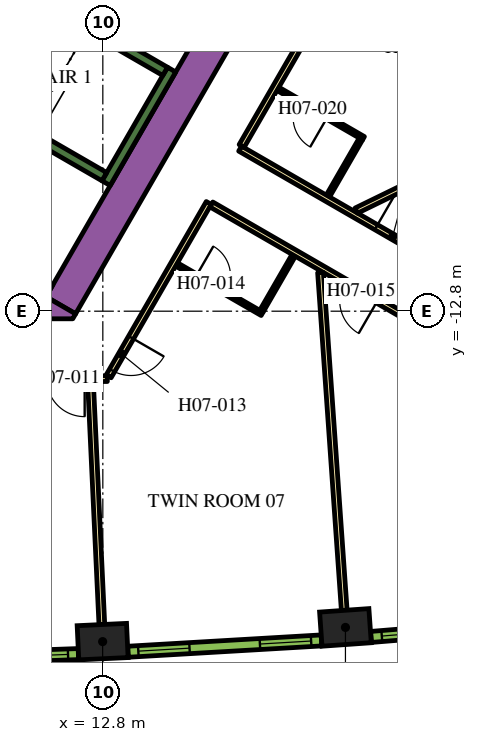
"""IFC4 building model, lengths in metres.
Left out: names, types, materials, properties, quantities, classifications, styles, units other than length and angle.
Written with IfcOpenShell. Run it as: python <this file> out.ifc"""

import sys

from ifc_helpers import new_model, si_unit, direction, frame, frame_2d, origin, origin_2d, place, context, subcontext, project, spatial, polyline, rectangle, outline, extrude, element, fill, save


model = new_model("IFC4")
c1 = context("Model", 3, precision=1e-05, world=origin(), true_north=direction((0.0, 1.0)))
c2 = subcontext(c1, "Body", "Model", "MODEL_VIEW")
j1 = project(units=[si_unit("LENGTHUNIT", "METRE"), si_unit("PLANEANGLEUNIT", "RADIAN")], contexts=[c1])
p1 = place(None, origin())
s1 = spatial("IfcSite", under=j1, at=p1, CompositionType="ELEMENT")
p2 = place(p1, origin())
s2 = spatial("IfcBuilding", under=s1, at=p2, CompositionType="ELEMENT")
p3 = place(p2, frame((0.0, 0.0, 103.2)))
s3 = spatial("IfcBuildingStorey", under=s2, at=p3, CompositionType="ELEMENT", Elevation=103.2)
for number, where, z_axis, x_axis in (
    (1, (12.795, -21.494, 0.0), (0.0, 0.0, 1.0), (0.999, 0.047, 0.0)),
    (2, (19.184, -21.12, 0.0), (0.0, 0.0, 1.0), (0.998, 0.07, 0.0)),
):
    element("IfcColumn", number, at=place(p3, frame(where, z_axis=z_axis, x_axis=x_axis)), inside=s3, PredefinedType="COLUMN", context=c2, shape_type="SweptSolid", body=[
        extrude(rectangle(XDim=1.3, YDim=0.9, at=origin_2d()), origin(), (0.0, 0.0, 1.0), 3.9),
    ])
p4 = place(p3, frame((11.695, -12.644, 0.0), z_axis=(0.0, 0.0, 1.0), x_axis=(0.500010229568, 0.86601949766, 0.0)))
e3 = element("IfcWall", 3, at=p4, inside=s3, PredefinedType="SOLIDWALL", context=c2, shape_type="SweptSolid", body=[
    extrude(rectangle(XDim=9.326, YDim=0.9, at=frame_2d((4.663, 0.0))), origin(), (0.0, 0.0, 1.0), 3.9),
])
p5 = place(p3, origin())
e4 = element("IfcWall", 4, at=p5, inside=s3, PredefinedType="SOLIDWALL", context=c2, shape_type="SweptSolid", body=[
    extrude(outline(polyline([(12.009, -13.0), (11.312, -13.0), (11.312, -12.425), (12.083, -12.871), (12.009, -13.0)])), origin(), (0.0, 0.0, 1.0), 3.9),
])
e5 = element("IfcWall", 5, at=p5, inside=s3, PredefinedType="SOLIDWALL", context=c2, shape_type="SweptSolid", body=[
    extrude(outline(polyline([(11.489, -12.1), (11.312, -12.407), (11.312, -12.1), (11.489, -12.1)])), origin(), (0.0, 0.0, 1.0), 3.9),
])
p6 = place(p3, frame((12.885, -9.431, 0.0), z_axis=(0.0, 0.0, 1.0), x_axis=(0.500020560727, 0.866013532718, 0.0)))
e6 = element("IfcWall", 6, at=p6, inside=s3, PredefinedType="SOLIDWALL", context=c2, shape_type="SweptSolid", body=[
    extrude(rectangle(XDim=3.45, YDim=0.25, at=frame_2d((1.725, 0.0))), origin(), (0.0, 0.0, 1.0), 3.9),
])
p7 = place(p3, frame((12.84, -9.261, 0.0), z_axis=(0.0, 0.0, 1.0), x_axis=(-0.866013990052, 0.500019768644, 0.0)))
e7 = element("IfcWall", 7, at=p7, inside=s3, PredefinedType="SOLIDWALL", context=c2, shape_type="SweptSolid", body=[
    extrude(rectangle(XDim=6.8, YDim=0.25, at=frame_2d((3.4, 0.0))), origin(), (0.0, 0.0, 1.0), 3.9),
])
p8 = place(p3, frame((8.334, -2.964, 0.0), z_axis=(0.0, 0.0, 1.0), x_axis=(0.866016039709, -0.500016218704, 0.0)))
e8 = element("IfcWall", 8, at=p8, inside=s3, PredefinedType="SOLIDWALL", context=c2, shape_type="SweptSolid", body=[
    extrude(rectangle(XDim=7.05, YDim=0.25, at=frame_2d((3.525, 0.0))), origin(), (0.0, 0.0, 1.0), 3.9),
])
p9 = place(p3, frame((16.412, -8.523, 0.0), z_axis=(0.0, 0.0, 1.0), x_axis=(0.866025629663, -0.499999608766, 0.0)))
e9 = element("IfcWall", 9, at=p9, inside=s3, PredefinedType="PARTITIONING", context=c2, shape_type="SweptSolid", body=[
    extrude(rectangle(XDim=13.624, YDim=0.15, at=frame_2d((6.812, 0.0))), origin(), (0.0, 0.0, 1.0), 2.75),
])
p10 = place(p9, frame((4.134, 0.0, 0.0)))
e10 = element("IfcOpeningElement", 10, at=p10, cuts=e9, PredefinedType="OPENING", context=c2, shape_type="SweptSolid", body=[
    extrude(rectangle(XDim=1.0, YDim=2.1, at=frame_2d((0.5, 1.05))), frame((0.0, 0.085, 0.0), z_axis=(0.0, -1.0, 0.0), x_axis=(1.0, 0.0, 0.0)), (0.0, 0.0, 1.0), 0.17),
])
p11 = place(p3, frame((19.081, -3.9, 0.0), z_axis=(0.0, 0.0, 1.0), x_axis=(-0.499974327079, -0.866040225545, 0.0)))
e11 = element("IfcWall", 11, at=p11, inside=s3, PredefinedType="PARTITIONING", context=c2, shape_type="SweptSolid", body=[
    extrude(rectangle(XDim=5.258, YDim=0.15, at=frame_2d((2.629, 0.0))), origin(), (0.0, 0.0, 1.0), 2.75),
])
p12 = place(p11, frame((0.18, 0.0, 0.0)))
e12 = element("IfcOpeningElement", 12, at=p12, cuts=e11, PredefinedType="OPENING", context=c2, shape_type="SweptSolid", body=[
    extrude(rectangle(XDim=1.0, YDim=2.1, at=frame_2d((0.5, 1.05))), frame((0.0, 0.085, 0.0), z_axis=(0.0, -1.0, 0.0), x_axis=(1.0, 0.0, 0.0)), (0.0, 0.0, 1.0), 0.17),
])
p13 = place(p3, frame((12.918, -14.575, 0.0), z_axis=(0.0, 0.0, 1.0), x_axis=(-1.0, 0.0, 0.0)))
e13 = element("IfcWall", 13, at=p13, inside=s3, PredefinedType="PARTITIONING", context=c2, shape_type="SweptSolid", body=[
    extrude(rectangle(XDim=25.766, YDim=0.15, at=frame_2d((12.883, 0.0))), origin(), (0.0, 0.0, 1.0), 2.75),
])
p14 = place(p13, frame((24.24, 0.0, 0.0)))
e14 = element("IfcOpeningElement", 14, at=p14, cuts=e13, PredefinedType="OPENING", context=c2, shape_type="SweptSolid", body=[
    extrude(rectangle(XDim=1.0, YDim=2.1, at=frame_2d((0.5, 1.05))), frame((0.0, 0.085, 0.0), z_axis=(0.0, -1.0, 0.0), x_axis=(1.0, 0.0, 0.0)), (0.0, 0.0, 1.0), 0.17),
])
p15 = place(p13, frame((13.144, 0.0, 0.0)))
e15 = element("IfcOpeningElement", 15, at=p15, cuts=e13, PredefinedType="OPENING", context=c2, shape_type="SweptSolid", body=[
    extrude(rectangle(XDim=1.0, YDim=2.1, at=frame_2d((0.5, 1.05))), frame((0.0, 0.085, 0.0), z_axis=(0.0, -1.0, 0.0), x_axis=(1.0, 0.0, 0.0)), (0.0, 0.0, 1.0), 0.17),
])
p16 = place(p13, frame((11.693, 0.0, 0.0)))
e16 = element("IfcOpeningElement", 16, at=p16, cuts=e13, PredefinedType="OPENING", context=c2, shape_type="SweptSolid", body=[
    extrude(rectangle(XDim=1.0, YDim=2.1, at=frame_2d((0.5, 1.05))), frame((0.0, 0.085, 0.0), z_axis=(0.0, -1.0, 0.0), x_axis=(1.0, 0.0, 0.0)), (0.0, 0.0, 1.0), 0.17),
])
p17 = place(p13, frame((0.596, 0.0, 0.0)))
e17 = element("IfcOpeningElement", 17, at=p17, cuts=e13, PredefinedType="OPENING", context=c2, shape_type="SweptSolid", body=[
    extrude(rectangle(XDim=1.0, YDim=2.1, at=frame_2d((0.5, 1.05))), frame((0.0, 0.085, 0.0), z_axis=(0.0, -1.0, 0.0), x_axis=(1.0, 0.0, 0.0)), (0.0, 0.0, 1.0), 0.17),
])
p18 = place(p3, frame((15.587, -9.952, 0.0), z_axis=(0.0, 0.0, 1.0), x_axis=(-0.500016618951, -0.866015808616, 0.0)))
e18 = element("IfcWall", 18, at=p18, inside=s3, PredefinedType="PARTITIONING", context=c2, shape_type="SweptSolid", body=[
    extrude(rectangle(XDim=5.268, YDim=0.15, at=frame_2d((2.634, 0.0))), origin(), (0.0, 0.0, 1.0), 2.75),
])
p19 = place(p18, frame((4.088, 0.0, 0.0)))
e19 = element("IfcOpeningElement", 19, at=p19, cuts=e18, PredefinedType="OPENING", context=c2, shape_type="SweptSolid", body=[
    extrude(rectangle(XDim=1.0, YDim=2.1, at=frame_2d((0.5, 1.05))), frame((0.0, 0.085, 0.0), z_axis=(0.0, -1.0, 0.0), x_axis=(1.0, 0.0, 0.0)), (0.0, 0.0, 1.0), 0.17),
])
p20 = place(p3, frame((27.386, -16.764, 0.0), z_axis=(0.0, 0.0, 1.0), x_axis=(-0.866022585856, 0.500004880763, 0.0)))
e20 = element("IfcWall", 20, at=p20, inside=s3, PredefinedType="PARTITIONING", context=c2, shape_type="SweptSolid", body=[
    extrude(rectangle(XDim=13.544, YDim=0.15, at=frame_2d((6.772, 0.0))), origin(), (0.0, 0.0, 1.0), 2.75),
])
p21 = place(p20, frame((8.491, 0.0, 0.0)))
e21 = element("IfcOpeningElement", 21, at=p21, cuts=e20, PredefinedType="OPENING", context=c2, shape_type="SweptSolid", body=[
    extrude(rectangle(XDim=1.0, YDim=2.1, at=frame_2d((0.5, 1.05))), frame((0.0, 0.085, 0.0), z_axis=(0.0, -1.0, 0.0), x_axis=(1.0, 0.0, 0.0)), (0.0, 0.0, 1.0), 0.17),
])
p22 = place(p3, frame((12.774, -21.045, 0.0), z_axis=(0.0, 0.0, 1.0), x_axis=(-0.046750341626, 0.998906605023, 0.0)))
e22 = element("IfcWall", 22, at=p22, inside=s3, PredefinedType="PARTITIONING", context=c2, shape_type="SweptSolid", body=[
    extrude(rectangle(XDim=6.392, YDim=0.15, at=frame_2d((3.196, 0.0))), origin(), (0.0, 0.0, 1.0), 2.75),
])
p23 = place(p3, frame((19.153, -20.671, 0.0), z_axis=(0.0, 0.0, 1.0), x_axis=(-0.070070736723, 0.997542025107, 0.0)))
e23 = element("IfcWall", 23, at=p23, inside=s3, PredefinedType="PARTITIONING", context=c2, shape_type="SweptSolid", body=[
    extrude(rectangle(XDim=8.909, YDim=0.15, at=frame_2d((4.455, 0.0))), origin(), (0.0, 0.0, 1.0), 2.75),
])
p24 = place(p3, frame((27.479, -6.251, 0.0), z_axis=(0.0, 0.0, 1.0), x_axis=(-0.898945877276, -0.438059710231, 0.0)))
e24 = element("IfcWall", 24, at=p24, inside=s3, PredefinedType="PARTITIONING", context=c2, shape_type="SweptSolid", body=[
    extrude(rectangle(XDim=8.909, YDim=0.15, at=frame_2d((4.455, 0.0))), origin(), (0.0, 0.0, 1.0), 2.75),
])
p25 = place(p3, frame((14.74, -11.57, 0.0), z_axis=(0.0, 0.0, 1.0), x_axis=(0.866021400173, -0.500006934395, 0.0)))
e25 = element("IfcWall", 25, at=p25, inside=s3, PredefinedType="PARTITIONING", context=c2, shape_type="SweptSolid", body=[
    extrude(rectangle(XDim=2.6, YDim=0.1, at=frame_2d((1.3, 0.0))), origin(), (0.0, 0.0, 1.0), 2.75),
])
p26 = place(p25, frame((0.6, 0.0, 0.0)))
e26 = element("IfcOpeningElement", 26, at=p26, cuts=e25, PredefinedType="OPENING", context=c2, shape_type="SweptSolid", body=[
    extrude(rectangle(XDim=0.9, YDim=2.1, at=frame_2d((0.45, 1.05))), frame((0.0, 0.06, 0.0), z_axis=(0.0, -1.0, 0.0), x_axis=(1.0, 0.0, 0.0)), (0.0, 0.0, 1.0), 0.12),
])
p27 = place(p3, frame((16.978, -12.793, 0.0), z_axis=(0.0, 0.0, 1.0), x_axis=(0.500147619332, 0.865940158947, 0.0)))
e27 = element("IfcWall", 27, at=p27, inside=s3, PredefinedType="PARTITIONING", context=c2, shape_type="SweptSolid", body=[
    extrude(rectangle(XDim=1.69, YDim=0.1, at=frame_2d((0.845, 0.0))), origin(), (0.0, 0.0, 1.0), 2.75),
])
p28 = place(p3, frame((19.659, -8.25, 0.0), z_axis=(0.0, 0.0, 1.0), x_axis=(-0.866021400173, 0.500006934395, 0.0)))
e28 = element("IfcWall", 28, at=p28, inside=s3, PredefinedType="PARTITIONING", context=c2, shape_type="SweptSolid", body=[
    extrude(rectangle(XDim=2.6, YDim=0.1, at=frame_2d((1.3, 0.0))), origin(), (0.0, 0.0, 1.0), 2.75),
])
p29 = place(p28, frame((1.1, 0.0, 0.0)))
e29 = element("IfcOpeningElement", 29, at=p29, cuts=e28, PredefinedType="OPENING", context=c2, shape_type="SweptSolid", body=[
    extrude(rectangle(XDim=0.9, YDim=2.1, at=frame_2d((0.45, 1.05))), frame((0.0, 0.06, 0.0), z_axis=(0.0, -1.0, 0.0), x_axis=(1.0, 0.0, 0.0)), (0.0, 0.0, 1.0), 0.12),
])
p30 = place(p3, frame((19.591, -8.268, 0.0), z_axis=(0.0, 0.0, 1.0), x_axis=(-0.500040090343, -0.866002256377, 0.0)))
e30 = element("IfcWall", 30, at=p30, inside=s3, PredefinedType="PARTITIONING", context=c2, shape_type="SweptSolid", body=[
    extrude(rectangle(XDim=1.73, YDim=0.1, at=frame_2d((0.865, 0.0))), origin(), (0.0, 0.0, 1.0), 2.75),
])
p31 = place(p3, frame((7.059, -22.001, 0.0), z_axis=(0.0, 0.0, 1.0), x_axis=(0.999385993957, 0.035037623812, 0.0)))
e31 = element("IfcWall", 31, at=p31, inside=s3, PredefinedType="SOLIDWALL", context=c2, shape_type="SweptSolid", body=[
    extrude(rectangle(XDim=5.101, YDim=0.29, at=frame_2d((2.55, 0.0))), origin(), (0.0, 0.0, 1.0), 3.65),
])
p32 = place(p31, frame((0.273, 0.0, 0.9)))
e32 = element("IfcOpeningElement", 32, at=p32, cuts=e31, PredefinedType="OPENING", context=c2, shape_type="SweptSolid", body=[
    extrude(rectangle(XDim=1.35, YDim=2.15, at=frame_2d((0.675, 1.075))), frame((0.0, 0.155, 0.0), z_axis=(0.0, -1.0, 0.0), x_axis=(1.0, 0.0, 0.0)), (0.0, 0.0, 1.0), 0.31),
])
p33 = place(p31, frame((3.478, 0.0, 0.9)))
e33 = element("IfcOpeningElement", 33, at=p33, cuts=e31, PredefinedType="OPENING", context=c2, shape_type="SweptSolid", body=[
    extrude(rectangle(XDim=1.35, YDim=2.15, at=frame_2d((0.675, 1.075))), frame((0.0, 0.155, 0.0), z_axis=(0.0, -1.0, 0.0), x_axis=(1.0, 0.0, 0.0)), (0.0, 0.0, 1.0), 0.31),
])
p34 = place(p3, frame((13.462, -21.761, 0.0), z_axis=(0.0, 0.0, 1.0), x_axis=(0.998290511436, 0.058447025388, 0.0)))
e34 = element("IfcWall", 34, at=p34, inside=s3, PredefinedType="SOLIDWALL", context=c2, shape_type="SweptSolid", body=[
    extrude(rectangle(XDim=5.1, YDim=0.29, at=frame_2d((2.55, 0.0))), origin(), (0.0, 0.0, 1.0), 3.65),
])
p35 = place(p34, frame((0.272, 0.0, 0.9)))
e35 = element("IfcOpeningElement", 35, at=p35, cuts=e34, PredefinedType="OPENING", context=c2, shape_type="SweptSolid", body=[
    extrude(rectangle(XDim=1.35, YDim=2.15, at=frame_2d((0.675, 1.075))), frame((0.0, 0.155, 0.0), z_axis=(0.0, -1.0, 0.0), x_axis=(1.0, 0.0, 0.0)), (0.0, 0.0, 1.0), 0.31),
])
p36 = place(p34, frame((3.478, 0.0, 0.9)))
e36 = element("IfcOpeningElement", 36, at=p36, cuts=e34, PredefinedType="OPENING", context=c2, shape_type="SweptSolid", body=[
    extrude(rectangle(XDim=1.35, YDim=2.15, at=frame_2d((0.675, 1.075))), frame((0.0, 0.155, 0.0), z_axis=(0.0, -1.0, 0.0), x_axis=(1.0, 0.0, 0.0)), (0.0, 0.0, 1.0), 0.31),
])
p37 = place(p3, frame((19.857, -21.371, 0.0), z_axis=(0.0, 0.0, 1.0), x_axis=(0.99665273362, 0.081751627308, 0.0)))
e37 = element("IfcWall", 37, at=p37, inside=s3, PredefinedType="SOLIDWALL", context=c2, shape_type="SweptSolid", body=[
    extrude(rectangle(XDim=5.107, YDim=0.29, at=frame_2d((2.553, 0.0))), origin(), (0.0, 0.0, 1.0), 3.65),
])
p38 = place(p37, frame((0.285, 0.0, 0.9)))
e38 = element("IfcOpeningElement", 38, at=p38, cuts=e37, PredefinedType="OPENING", context=c2, shape_type="SweptSolid", body=[
    extrude(rectangle(XDim=1.35, YDim=2.15, at=frame_2d((0.675, 1.075))), frame((0.0, 0.155, 0.0), z_axis=(0.0, -1.0, 0.0), x_axis=(1.0, 0.0, 0.0)), (0.0, 0.0, 1.0), 0.31),
])
p39 = place(p37, frame((3.516, 0.0, 0.9)))
e39 = element("IfcOpeningElement", 39, at=p39, cuts=e37, PredefinedType="OPENING", context=c2, shape_type="SweptSolid", body=[
    extrude(rectangle(XDim=1.35, YDim=2.15, at=frame_2d((0.675, 1.075))), frame((0.0, 0.155, 0.0), z_axis=(0.0, -1.0, 0.0), x_axis=(1.0, 0.0, 0.0)), (0.0, 0.0, 1.0), 0.31),
])
p40 = place(p17, origin())
e40 = element("IfcDoor", 40, at=p40, inside=s3, OperationType="SINGLE_SWING_LEFT", PredefinedType="DOOR", context=c2, shape_type="SweptSolid", body=[
    extrude(rectangle(XDim=1.0, YDim=2.1, at=frame_2d((0.5, 1.05))), frame((0.0, 0.025, 0.0), z_axis=(0.0, -1.0, 0.0), x_axis=(1.0, 0.0, 0.0)), (0.0, 0.0, 1.0), 0.05),
])
fill(e17, e40)
p41 = place(p19, origin())
e41 = element("IfcDoor", 41, at=p41, inside=s3, OperationType="SINGLE_SWING_RIGHT", PredefinedType="DOOR", context=c2, shape_type="SweptSolid", body=[
    extrude(rectangle(XDim=1.0, YDim=2.1, at=frame_2d((0.5, 1.05))), frame((0.0, 0.025, 0.0), z_axis=(0.0, -1.0, 0.0), x_axis=(1.0, 0.0, 0.0)), (0.0, 0.0, 1.0), 0.05),
])
fill(e19, e41)
p42 = place(p26, origin())
e42 = element("IfcDoor", 42, at=p42, inside=s3, OperationType="SINGLE_SWING_LEFT", PredefinedType="DOOR", context=c2, shape_type="SweptSolid", body=[
    extrude(rectangle(XDim=0.9, YDim=2.1, at=frame_2d((0.45, 1.05))), frame((0.0, 0.025, 0.0), z_axis=(0.0, -1.0, 0.0), x_axis=(1.0, 0.0, 0.0)), (0.0, 0.0, 1.0), 0.05),
])
fill(e26, e42)
p43 = place(p21, origin())
e43 = element("IfcDoor", 43, at=p43, inside=s3, OperationType="SINGLE_SWING_RIGHT", PredefinedType="DOOR", context=c2, shape_type="SweptSolid", body=[
    extrude(rectangle(XDim=1.0, YDim=2.1, at=frame_2d((0.5, 1.05))), frame((0.0, 0.025, 0.0), z_axis=(0.0, -1.0, 0.0), x_axis=(1.0, 0.0, 0.0)), (0.0, 0.0, 1.0), 0.05),
])
fill(e21, e43)
p44 = place(p10, origin())
e44 = element("IfcDoor", 44, at=p44, inside=s3, OperationType="SINGLE_SWING_LEFT", PredefinedType="DOOR", context=c2, shape_type="SweptSolid", body=[
    extrude(rectangle(XDim=1.0, YDim=2.1, at=frame_2d((0.5, 1.05))), frame((0.0, 0.025, 0.0), z_axis=(0.0, -1.0, 0.0), x_axis=(1.0, 0.0, 0.0)), (0.0, 0.0, 1.0), 0.05),
])
fill(e10, e44)
p45 = place(p29, origin())
e45 = element("IfcDoor", 45, at=p45, inside=s3, OperationType="SINGLE_SWING_LEFT", PredefinedType="DOOR", context=c2, shape_type="SweptSolid", body=[
    extrude(rectangle(XDim=0.9, YDim=2.1, at=frame_2d((0.45, 1.05))), frame((0.0, 0.025, 0.0), z_axis=(0.0, -1.0, 0.0), x_axis=(1.0, 0.0, 0.0)), (0.0, 0.0, 1.0), 0.05),
])
fill(e29, e45)
p46 = place(p33, origin())
e46 = element("IfcWindow", 46, at=p46, inside=s3, PartitioningType="DOUBLE_PANEL_VERTICAL", PredefinedType="WINDOW", context=c2, shape_type="SweptSolid", body=[
    extrude(rectangle(XDim=1.35, YDim=2.15, at=frame_2d((0.675, 1.075))), frame((0.0, 0.015, 0.0), z_axis=(0.0, -1.0, 0.0), x_axis=(1.0, 0.0, 0.0)), (0.0, 0.0, 1.0), 0.06),
])
fill(e33, e46)
p47 = place(p35, origin())
e47 = element("IfcWindow", 47, at=p47, inside=s3, PartitioningType="DOUBLE_PANEL_VERTICAL", PredefinedType="WINDOW", context=c2, shape_type="SweptSolid", body=[
    extrude(rectangle(XDim=1.35, YDim=2.15, at=frame_2d((0.675, 1.075))), frame((0.0, 0.015, 0.0), z_axis=(0.0, -1.0, 0.0), x_axis=(1.0, 0.0, 0.0)), (0.0, 0.0, 1.0), 0.06),
])
fill(e35, e47)
p48 = place(p36, origin())
e48 = element("IfcWindow", 48, at=p48, inside=s3, PartitioningType="DOUBLE_PANEL_VERTICAL", PredefinedType="WINDOW", context=c2, shape_type="SweptSolid", body=[
    extrude(rectangle(XDim=1.35, YDim=2.15, at=frame_2d((0.675, 1.075))), frame((0.0, 0.015, 0.0), z_axis=(0.0, -1.0, 0.0), x_axis=(1.0, 0.0, 0.0)), (0.0, 0.0, 1.0), 0.06),
])
fill(e36, e48)
p49 = place(p38, origin())
e49 = element("IfcWindow", 49, at=p49, inside=s3, PartitioningType="DOUBLE_PANEL_VERTICAL", PredefinedType="WINDOW", context=c2, shape_type="SweptSolid", body=[
    extrude(rectangle(XDim=1.35, YDim=2.15, at=frame_2d((0.675, 1.075))), frame((0.0, 0.015, 0.0), z_axis=(0.0, -1.0, 0.0), x_axis=(1.0, 0.0, 0.0)), (0.0, 0.0, 1.0), 0.06),
])
fill(e38, e49)
save(model, sys.argv[1])
